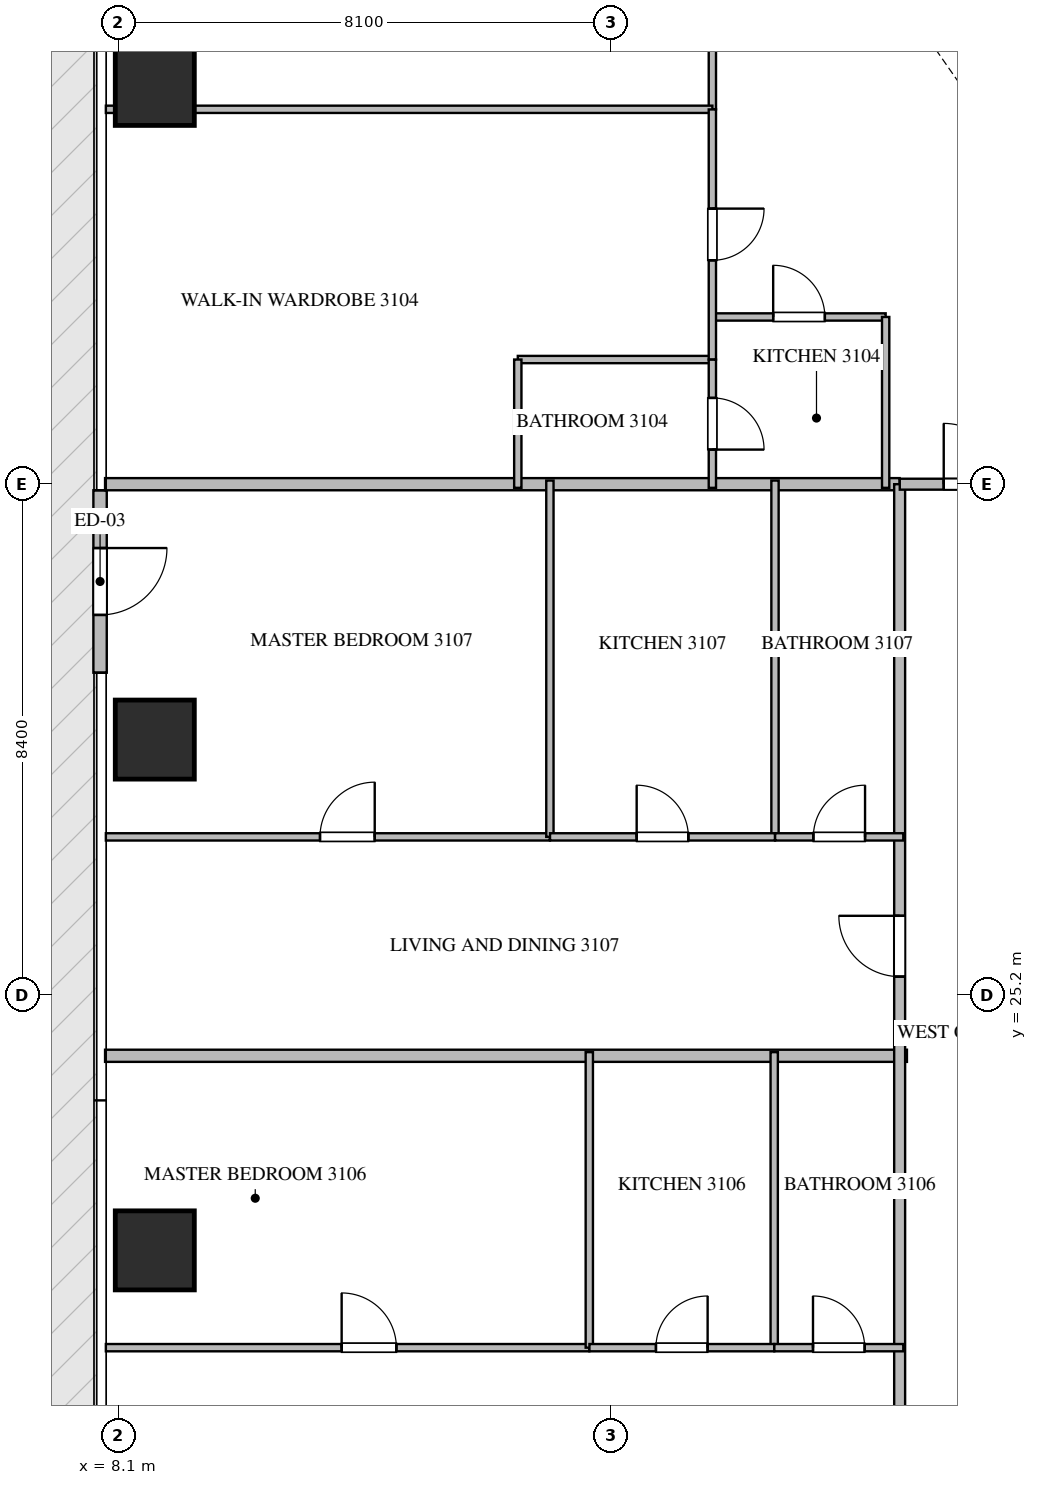
"""IFC4 building model, lengths in metres.
Left out: names, types, materials, properties, quantities, classifications, styles, units other than length and angle.
Written with IfcOpenShell. Run it as: python <this file> out.ifc"""

import sys

from ifc_helpers import new_model, si_unit, direction, frame, frame_2d, origin, origin_2d, place, context, subcontext, project, spatial, rectangle, extrude, source, transform, mapped, element, fill, save


model = new_model("IFC4")
c1 = context("Model", 3, precision=1e-05, world=origin(), true_north=direction((0.0, 1.0)))
c2 = subcontext(c1, "Body", "Model", "MODEL_VIEW")
j1 = project(units=[si_unit("LENGTHUNIT", "METRE"), si_unit("PLANEANGLEUNIT", "RADIAN")], contexts=[c1])
p1 = place(None, origin())
s1 = spatial("IfcSite", under=j1, at=p1, CompositionType="ELEMENT")
p2 = place(p1, origin())
s2 = spatial("IfcBuilding", under=s1, at=p2, CompositionType="ELEMENT")
p3 = place(p2, frame((0.0, 0.0, 127.65)))
s3 = spatial("IfcBuildingStorey", under=s2, at=p3, CompositionType="ELEMENT", Elevation=127.65)
m1 = source(origin(), c2, "Body", "SweptSolid", [
    extrude(rectangle(XDim=1.3, YDim=1.3, at=origin_2d()), origin(), (0.0, 0.0, 1.0), 3.75),
])
for number, where, z_axis, x_axis in (
    (1, (8.7, 21.0, -0.26), (0.0, 0.0, 1.0), (1.0, 0.0, 0.0)),
    (2, (8.7, 29.4, -0.26), (0.0, 0.0, 1.0), (1.0, 0.0, 0.0)),
    (3, (8.7, 40.15, -0.26), (0.0, 0.0, 1.0), (1.0, 0.0, 0.0)),
):
    element("IfcColumn", number, at=place(p3, frame(where, z_axis=z_axis, x_axis=x_axis)), inside=s3, PredefinedType="COLUMN", context=c2, shape_type="MappedRepresentation", body=[
        mapped(m1, transform((0.0, 0.0, 0.0), scale=1.0)),
    ])
p4 = place(p3, frame((7.8, 33.5, 0.0), z_axis=(0.0, 0.0, 1.0), x_axis=(0.0, -1.0, 0.0)))
e4 = element("IfcWall", 4, at=p4, inside=s3, PredefinedType="ELEMENTEDWALL", context=c2, shape_type="SweptSolid", body=[
    extrude(rectangle(XDim=3.0, YDim=0.22, at=frame_2d((1.5, 0.0))), origin(), (0.0, 0.0, 1.0), 3.475),
])
p5 = place(p4, frame((0.95, 0.0, 0.0)))
e5 = element("IfcOpeningElement", 5, at=p5, cuts=e4, PredefinedType="OPENING", context=c2, shape_type="SweptSolid", body=[
    extrude(rectangle(XDim=1.1, YDim=2.2, at=frame_2d((0.55, 1.1))), frame((0.0, 0.12, 0.0), z_axis=(0.0, -1.0, 0.0), x_axis=(1.0, 0.0, 0.0)), (0.0, 0.0, 1.0), 0.24),
])
p6 = place(p3, frame((7.882, 24.2, 0.0), z_axis=(0.0, 0.0, 1.0), x_axis=(1.0, 0.0, 0.0)))
e6 = element("IfcWall", 6, at=p6, inside=s3, PredefinedType="PARTITIONING", context=c2, shape_type="SweptSolid", body=[
    extrude(rectangle(XDim=13.188, YDim=0.2, at=frame_2d((6.594, 0.0))), origin(), (0.0, 0.0, 1.0), 3.49),
])
p7 = place(p3, frame((7.882, 33.6, 0.0), z_axis=(0.0, 0.0, 1.0), x_axis=(1.0, 0.0, 0.0)))
e7 = element("IfcWall", 7, at=p7, inside=s3, PredefinedType="PARTITIONING", context=c2, shape_type="SweptSolid", body=[
    extrude(rectangle(XDim=13.068, YDim=0.2, at=frame_2d((6.534, 0.0))), origin(), (0.0, 0.0, 1.0), 3.49),
])
p8 = place(p3, frame((20.95, 14.9, 0.0), z_axis=(0.0, 0.0, 1.0), x_axis=(0.0, 1.0, 0.0)))
e8 = element("IfcWall", 8, at=p8, inside=s3, PredefinedType="PARTITIONING", context=c2, shape_type="SweptSolid", body=[
    extrude(rectangle(XDim=18.7, YDim=0.18, at=frame_2d((9.35, 0.0))), origin(), (0.0, 0.0, 1.0), 3.49),
])
p9 = place(p8, frame((1.805, 0.0, 0.0)))
e9 = element("IfcOpeningElement", 9, at=p9, cuts=e8, PredefinedType="OPENING", context=c2, shape_type="SweptSolid", body=[
    extrude(rectangle(XDim=1.0, YDim=2.15, at=frame_2d((0.5, 1.075))), frame((0.0, 0.1, 0.0), z_axis=(0.0, -1.0, 0.0), x_axis=(1.0, 0.0, 0.0)), (0.0, 0.0, 1.0), 0.2),
])
p10 = place(p8, frame((10.602, 0.0, 0.0)))
e10 = element("IfcOpeningElement", 10, at=p10, cuts=e8, PredefinedType="OPENING", context=c2, shape_type="SweptSolid", body=[
    extrude(rectangle(XDim=1.0, YDim=2.15, at=frame_2d((0.5, 1.075))), frame((0.0, 0.1, 0.0), z_axis=(0.0, -1.0, 0.0), x_axis=(1.0, 0.0, 0.0)), (0.0, 0.0, 1.0), 0.2),
])
p11 = place(p3, frame((20.952, 33.6, 0.0), z_axis=(0.0, 0.0, 1.0), x_axis=(1.0, 0.0, 0.0)))
e11 = element("IfcWall", 11, at=p11, inside=s3, PredefinedType="PARTITIONING", context=c2, shape_type="SweptSolid", body=[
    extrude(rectangle(XDim=2.446, YDim=0.18, at=frame_2d((1.223, 0.0))), origin(), (0.0, 0.0, 1.0), 3.49),
])
p12 = place(p11, frame((0.723, 0.0, 0.0)))
e12 = element("IfcOpeningElement", 12, at=p12, cuts=e11, PredefinedType="OPENING", context=c2, shape_type="SweptSolid", body=[
    extrude(rectangle(XDim=1.0, YDim=2.15, at=frame_2d((0.5, 1.075))), frame((0.0, 0.1, 0.0), z_axis=(0.0, -1.0, 0.0), x_axis=(1.0, 0.0, 0.0)), (0.0, 0.0, 1.0), 0.2),
])
p13 = place(p3, frame((17.87, 36.35, 0.0), z_axis=(0.0, 0.0, 1.0), x_axis=(1.0, 0.0, 0.0)))
e13 = element("IfcWall", 13, at=p13, inside=s3, PredefinedType="PARTITIONING", context=c2, shape_type="SweptSolid", body=[
    extrude(rectangle(XDim=2.85, YDim=0.12, at=frame_2d((1.425, 0.0))), origin(), (0.0, 0.0, 1.0), 3.49),
])
p14 = place(p13, frame((1.0, 0.0, 0.0)))
e14 = element("IfcOpeningElement", 14, at=p14, cuts=e13, PredefinedType="OPENING", context=c2, shape_type="SweptSolid", body=[
    extrude(rectangle(XDim=0.85, YDim=2.1, at=frame_2d((0.425, 1.05))), frame((0.0, 0.07, 0.0), z_axis=(0.0, -1.0, 0.0), x_axis=(1.0, 0.0, 0.0)), (0.0, 0.0, 1.0), 0.14),
])
p15 = place(p3, frame((20.72, 36.35, 0.0), z_axis=(0.0, 0.0, 1.0), x_axis=(0.0, -1.0, 0.0)))
e15 = element("IfcWall", 15, at=p15, inside=s3, PredefinedType="PARTITIONING", context=c2, shape_type="SweptSolid", body=[
    extrude(rectangle(XDim=2.81, YDim=0.12, at=frame_2d((1.405, 0.0))), origin(), (0.0, 0.0, 1.0), 3.49),
])
p16 = place(p3, frame((17.87, 48.905, 0.0), z_axis=(0.0, 0.0, 1.0), x_axis=(0.0, -1.0, 0.0)))
e16 = element("IfcWall", 16, at=p16, inside=s3, PredefinedType="PARTITIONING", context=c2, shape_type="SweptSolid", body=[
    extrude(rectangle(XDim=9.14, YDim=0.12, at=frame_2d((4.57, 0.0))), origin(), (0.0, 0.0, 1.0), 3.49),
])
p17 = place(p16, frame((4.532, 0.0, 0.0)))
e17 = element("IfcOpeningElement", 17, at=p17, cuts=e16, PredefinedType="OPENING", context=c2, shape_type="SweptSolid", body=[
    extrude(rectangle(XDim=0.9, YDim=2.1, at=frame_2d((0.45, 1.05))), frame((0.0, 0.07, 0.0), z_axis=(0.0, -1.0, 0.0), x_axis=(1.0, 0.0, 0.0)), (0.0, 0.0, 1.0), 0.14),
])
p18 = place(p3, frame((7.895, 39.765, 0.0), z_axis=(0.0, 0.0, 1.0), x_axis=(1.0, 0.0, 0.0)))
e18 = element("IfcWall", 18, at=p18, inside=s3, PredefinedType="PARTITIONING", context=c2, shape_type="SweptSolid", body=[
    extrude(rectangle(XDim=9.975, YDim=0.12, at=frame_2d((4.988, 0.0))), origin(), (0.0, 0.0, 1.0), 3.49),
])
p19 = place(p3, frame((14.67, 35.65, 0.0), z_axis=(0.0, 0.0, 1.0), x_axis=(1.0, 0.0, 0.0)))
e19 = element("IfcWall", 19, at=p19, inside=s3, PredefinedType="PARTITIONING", context=c2, shape_type="SweptSolid", body=[
    extrude(rectangle(XDim=3.2, YDim=0.12, at=frame_2d((1.6, 0.0))), origin(), (0.0, 0.0, 1.0), 3.49),
])
p20 = place(p3, frame((14.67, 35.65, 0.0), z_axis=(0.0, 0.0, 1.0), x_axis=(0.0, -1.0, 0.0)))
e20 = element("IfcWall", 20, at=p20, inside=s3, PredefinedType="PARTITIONING", context=c2, shape_type="SweptSolid", body=[
    extrude(rectangle(XDim=2.11, YDim=0.12, at=frame_2d((1.055, 0.0))), origin(), (0.0, 0.0, 1.0), 3.49),
])
p21 = place(p3, frame((17.87, 39.763, 0.0), z_axis=(0.0, 0.0, 1.0), x_axis=(0.0, -1.0, 0.0)))
e21 = element("IfcWall", 21, at=p21, inside=s3, PredefinedType="PARTITIONING", context=c2, shape_type="SweptSolid", body=[
    extrude(rectangle(XDim=4.113, YDim=0.12, at=frame_2d((2.057, 0.0))), origin(), (0.0, 0.0, 1.0), 3.49),
])
p22 = place(p21, frame((1.631, 0.0, 0.0)))
e22 = element("IfcOpeningElement", 22, at=p22, cuts=e21, PredefinedType="OPENING", context=c2, shape_type="SweptSolid", body=[
    extrude(rectangle(XDim=0.85, YDim=2.1, at=frame_2d((0.425, 1.05))), frame((0.0, 0.07, 0.0), z_axis=(0.0, -1.0, 0.0), x_axis=(1.0, 0.0, 0.0)), (0.0, 0.0, 1.0), 0.14),
])
p23 = place(p3, frame((17.87, 35.648, 0.0), z_axis=(0.0, 0.0, 1.0), x_axis=(0.0, -1.0, 0.0)))
e23 = element("IfcWall", 23, at=p23, inside=s3, PredefinedType="PARTITIONING", context=c2, shape_type="SweptSolid", body=[
    extrude(rectangle(XDim=2.108, YDim=0.12, at=frame_2d((1.054, 0.0))), origin(), (0.0, 0.0, 1.0), 3.49),
])
p24 = place(p23, frame((0.629, 0.0, 0.0)))
e24 = element("IfcOpeningElement", 24, at=p24, cuts=e23, PredefinedType="OPENING", context=c2, shape_type="SweptSolid", body=[
    extrude(rectangle(XDim=0.85, YDim=2.1, at=frame_2d((0.425, 1.05))), frame((0.0, 0.07, 0.0), z_axis=(0.0, -1.0, 0.0), x_axis=(1.0, 0.0, 0.0)), (0.0, 0.0, 1.0), 0.14),
])
p25 = place(p3, frame((7.895, 19.4, 0.0), z_axis=(0.0, 0.0, 1.0), x_axis=(1.0, 0.0, 0.0)))
e25 = element("IfcWall", 25, at=p25, inside=s3, PredefinedType="PARTITIONING", context=c2, shape_type="SweptSolid", body=[
    extrude(rectangle(XDim=7.951, YDim=0.12, at=frame_2d((3.976, 0.0))), origin(), (0.0, 0.0, 1.0), 3.49),
])
p26 = place(p25, frame((3.878, 0.0, 0.0)))
e26 = element("IfcOpeningElement", 26, at=p26, cuts=e25, PredefinedType="OPENING", context=c2, shape_type="SweptSolid", body=[
    extrude(rectangle(XDim=0.9, YDim=2.1, at=frame_2d((0.45, 1.05))), frame((0.0, 0.07, 0.0), z_axis=(0.0, -1.0, 0.0), x_axis=(1.0, 0.0, 0.0)), (0.0, 0.0, 1.0), 0.14),
])
for number, where, z_axis, x_axis in (
    (27, (15.846, 19.4, 0.0), (0.0, 0.0, 1.0), (0.0, 1.0, 0.0)),
    (28, (18.887, 19.4, 0.0), (0.0, 0.0, 1.0), (0.0, 1.0, 0.0)),
):
    element("IfcWall", number, at=place(p3, frame(where, z_axis=z_axis, x_axis=x_axis)), inside=s3, PredefinedType="PARTITIONING", context=c2, shape_type="SweptSolid", body=[
        extrude(rectangle(XDim=4.86, YDim=0.12, at=frame_2d((2.43, 0.0))), origin(), (0.0, 0.0, 1.0), 3.49),
    ])
p27 = place(p3, frame((15.848, 19.4, 0.0), z_axis=(0.0, 0.0, 1.0), x_axis=(1.0, 0.0, 0.0)))
e29 = element("IfcWall", 29, at=p27, inside=s3, PredefinedType="PARTITIONING", context=c2, shape_type="SweptSolid", body=[
    extrude(rectangle(XDim=3.039, YDim=0.12, at=frame_2d((1.52, 0.0))), origin(), (0.0, 0.0, 1.0), 3.49),
])
p28 = place(p27, frame((1.094, 0.0, 0.0)))
e30 = element("IfcOpeningElement", 30, at=p28, cuts=e29, PredefinedType="OPENING", context=c2, shape_type="SweptSolid", body=[
    extrude(rectangle(XDim=0.85, YDim=2.1, at=frame_2d((0.425, 1.05))), frame((0.0, 0.07, 0.0), z_axis=(0.0, -1.0, 0.0), x_axis=(1.0, 0.0, 0.0)), (0.0, 0.0, 1.0), 0.14),
])
p29 = place(p3, frame((18.889, 19.4, 0.0), z_axis=(0.0, 0.0, 1.0), x_axis=(1.0, 0.0, 0.0)))
e31 = element("IfcWall", 31, at=p29, inside=s3, PredefinedType="PARTITIONING", context=c2, shape_type="SweptSolid", body=[
    extrude(rectangle(XDim=2.121, YDim=0.12, at=frame_2d((1.061, 0.0))), origin(), (0.0, 0.0, 1.0), 3.49),
])
p30 = place(p29, frame((0.636, 0.0, 0.0)))
e32 = element("IfcOpeningElement", 32, at=p30, cuts=e31, PredefinedType="OPENING", context=c2, shape_type="SweptSolid", body=[
    extrude(rectangle(XDim=0.85, YDim=2.1, at=frame_2d((0.425, 1.05))), frame((0.0, 0.07, 0.0), z_axis=(0.0, -1.0, 0.0), x_axis=(1.0, 0.0, 0.0)), (0.0, 0.0, 1.0), 0.14),
])
p31 = place(p3, frame((7.895, 27.8, 0.0), z_axis=(0.0, 0.0, 1.0), x_axis=(1.0, 0.0, 0.0)))
e33 = element("IfcWall", 33, at=p31, inside=s3, PredefinedType="PARTITIONING", context=c2, shape_type="SweptSolid", body=[
    extrude(rectangle(XDim=7.303, YDim=0.12, at=frame_2d((3.651, 0.0))), origin(), (0.0, 0.0, 1.0), 3.49),
])
p32 = place(p31, frame((3.522, 0.0, 0.0)))
e34 = element("IfcOpeningElement", 34, at=p32, cuts=e33, PredefinedType="OPENING", context=c2, shape_type="SweptSolid", body=[
    extrude(rectangle(XDim=0.9, YDim=2.1, at=frame_2d((0.45, 1.05))), frame((0.0, 0.07, 0.0), z_axis=(0.0, -1.0, 0.0), x_axis=(1.0, 0.0, 0.0)), (0.0, 0.0, 1.0), 0.14),
])
for number, where, z_axis, x_axis in (
    (35, (15.198, 27.8, 0.0), (0.0, 0.0, 1.0), (0.0, 1.0, 0.0)),
    (36, (18.9, 27.8, 0.0), (0.0, 0.0, 1.0), (0.0, 1.0, 0.0)),
):
    element("IfcWall", number, at=place(p3, frame(where, z_axis=z_axis, x_axis=x_axis)), inside=s3, PredefinedType="PARTITIONING", context=c2, shape_type="SweptSolid", body=[
        extrude(rectangle(XDim=5.86, YDim=0.12, at=frame_2d((2.93, 0.0))), origin(), (0.0, 0.0, 1.0), 3.49),
    ])
p33 = place(p3, frame((15.2, 27.8, 0.0), z_axis=(0.0, 0.0, 1.0), x_axis=(1.0, 0.0, 0.0)))
e37 = element("IfcWall", 37, at=p33, inside=s3, PredefinedType="PARTITIONING", context=c2, shape_type="SweptSolid", body=[
    extrude(rectangle(XDim=3.7, YDim=0.12, at=frame_2d((1.85, 0.0))), origin(), (0.0, 0.0, 1.0), 3.49),
])
p34 = place(p33, frame((1.425, 0.0, 0.0)))
e38 = element("IfcOpeningElement", 38, at=p34, cuts=e37, PredefinedType="OPENING", context=c2, shape_type="SweptSolid", body=[
    extrude(rectangle(XDim=0.85, YDim=2.1, at=frame_2d((0.425, 1.05))), frame((0.0, 0.07, 0.0), z_axis=(0.0, -1.0, 0.0), x_axis=(1.0, 0.0, 0.0)), (0.0, 0.0, 1.0), 0.14),
])
p35 = place(p3, frame((18.902, 27.8, 0.0), z_axis=(0.0, 0.0, 1.0), x_axis=(1.0, 0.0, 0.0)))
e39 = element("IfcWall", 39, at=p35, inside=s3, PredefinedType="PARTITIONING", context=c2, shape_type="SweptSolid", body=[
    extrude(rectangle(XDim=2.108, YDim=0.12, at=frame_2d((1.054, 0.0))), origin(), (0.0, 0.0, 1.0), 3.49),
])
p36 = place(p35, frame((0.629, 0.0, 0.0)))
e40 = element("IfcOpeningElement", 40, at=p36, cuts=e39, PredefinedType="OPENING", context=c2, shape_type="SweptSolid", body=[
    extrude(rectangle(XDim=0.85, YDim=2.1, at=frame_2d((0.425, 1.05))), frame((0.0, 0.07, 0.0), z_axis=(0.0, -1.0, 0.0), x_axis=(1.0, 0.0, 0.0)), (0.0, 0.0, 1.0), 0.14),
])
m2 = source(origin(), c2, "Body", "SweptSolid", [
    extrude(rectangle(XDim=1.1, YDim=2.2, at=frame_2d((0.55, 1.1))), frame((0.0, 0.025, 0.0), z_axis=(0.0, -1.0, 0.0), x_axis=(1.0, 0.0, 0.0)), (0.0, 0.0, 1.0), 0.05),
])
p37 = place(p5, origin())
e41 = element("IfcDoor", 41, at=p37, inside=s3, OperationType="SINGLE_SWING_LEFT", PredefinedType="DOOR", context=c2, shape_type="MappedRepresentation", body=[
    mapped(m2, transform((0.0, 0.0, 0.0), scale=1.0)),
])
fill(e5, e41)
m3 = source(origin(), c2, "Body", "SweptSolid", [
    extrude(rectangle(XDim=1.0, YDim=2.15, at=frame_2d((0.5, 1.075))), frame((0.0, 0.025, 0.0), z_axis=(0.0, -1.0, 0.0), x_axis=(1.0, 0.0, 0.0)), (0.0, 0.0, 1.0), 0.05),
])
p38 = place(p10, origin())
e42 = element("IfcDoor", 42, at=p38, inside=s3, OperationType="SINGLE_SWING_RIGHT", PredefinedType="DOOR", context=c2, shape_type="MappedRepresentation", body=[
    mapped(m3, transform((0.0, 0.0, 0.0), scale=1.0)),
])
fill(e10, e42)
p39 = place(p12, origin())
e43 = element("IfcDoor", 43, at=p39, inside=s3, OperationType="SINGLE_SWING_LEFT", PredefinedType="DOOR", context=c2, shape_type="MappedRepresentation", body=[
    mapped(m3, transform((0.0, 0.0, 0.0), scale=1.0)),
])
fill(e12, e43)
m4 = source(origin(), c2, "Body", "SweptSolid", [
    extrude(rectangle(XDim=0.85, YDim=2.1, at=frame_2d((0.425, 1.05))), frame((0.0, 0.025, 0.0), z_axis=(0.0, -1.0, 0.0), x_axis=(1.0, 0.0, 0.0)), (0.0, 0.0, 1.0), 0.05),
])
p40 = place(p14, origin())
e44 = element("IfcDoor", 44, at=p40, inside=s3, OperationType="SINGLE_SWING_LEFT", PredefinedType="DOOR", context=c2, shape_type="MappedRepresentation", body=[
    mapped(m4, transform((0.0, 0.0, 0.0), scale=1.0)),
])
fill(e14, e44)
p41 = place(p22, origin())
e45 = element("IfcDoor", 45, at=p41, inside=s3, OperationType="SINGLE_SWING_LEFT", PredefinedType="DOOR", context=c2, shape_type="MappedRepresentation", body=[
    mapped(m4, transform((0.0, 0.0, 0.0), scale=1.0)),
])
fill(e22, e45)
p42 = place(p24, origin())
e46 = element("IfcDoor", 46, at=p42, inside=s3, OperationType="SINGLE_SWING_RIGHT", PredefinedType="DOOR", context=c2, shape_type="MappedRepresentation", body=[
    mapped(m4, transform((0.0, 0.0, 0.0), scale=1.0)),
])
fill(e24, e46)
m5 = source(origin(), c2, "Body", "SweptSolid", [
    extrude(rectangle(XDim=0.9, YDim=2.1, at=frame_2d((0.45, 1.05))), frame((0.0, 0.025, 0.0), z_axis=(0.0, -1.0, 0.0), x_axis=(1.0, 0.0, 0.0)), (0.0, 0.0, 1.0), 0.05),
])
p43 = place(p26, origin())
e47 = element("IfcDoor", 47, at=p43, inside=s3, OperationType="SINGLE_SWING_LEFT", PredefinedType="DOOR", context=c2, shape_type="MappedRepresentation", body=[
    mapped(m5, transform((0.0, 0.0, 0.0), scale=1.0)),
])
fill(e26, e47)
p44 = place(p28, origin())
e48 = element("IfcDoor", 48, at=p44, inside=s3, OperationType="SINGLE_SWING_RIGHT", PredefinedType="DOOR", context=c2, shape_type="MappedRepresentation", body=[
    mapped(m4, transform((0.0, 0.0, 0.0), scale=1.0)),
])
fill(e30, e48)
p45 = place(p30, origin())
e49 = element("IfcDoor", 49, at=p45, inside=s3, OperationType="SINGLE_SWING_LEFT", PredefinedType="DOOR", context=c2, shape_type="MappedRepresentation", body=[
    mapped(m4, transform((0.0, 0.0, 0.0), scale=1.0)),
])
fill(e32, e49)
p46 = place(p32, origin())
e50 = element("IfcDoor", 50, at=p46, inside=s3, OperationType="SINGLE_SWING_RIGHT", PredefinedType="DOOR", context=c2, shape_type="MappedRepresentation", body=[
    mapped(m5, transform((0.0, 0.0, 0.0), scale=1.0)),
])
fill(e34, e50)
p47 = place(p34, origin())
e51 = element("IfcDoor", 51, at=p47, inside=s3, OperationType="SINGLE_SWING_LEFT", PredefinedType="DOOR", context=c2, shape_type="MappedRepresentation", body=[
    mapped(m4, transform((0.0, 0.0, 0.0), scale=1.0)),
])
fill(e38, e51)
p48 = place(p36, origin())
e52 = element("IfcDoor", 52, at=p48, inside=s3, OperationType="SINGLE_SWING_RIGHT", PredefinedType="DOOR", context=c2, shape_type="MappedRepresentation", body=[
    mapped(m4, transform((0.0, 0.0, 0.0), scale=1.0)),
])
fill(e40, e52)
save(model, sys.argv[1])
